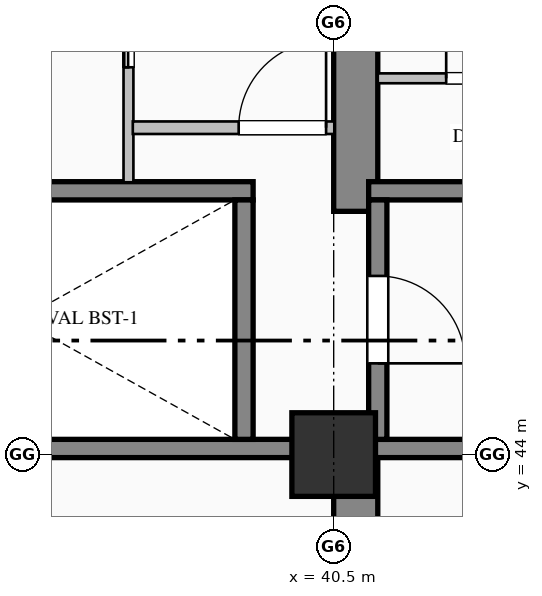
"""IFC4 building model, lengths in metres.
Left out: names, types, materials, properties, quantities, classifications, styles, units other than length and angle.
Written with IfcOpenShell. Run it as: python <this file> out.ifc"""

import sys

from ifc_helpers import new_model, si_unit, direction, frame, frame_2d, origin, origin_2d, place, context, subcontext, project, spatial, rectangle, extrude, element, fill, save


model = new_model("IFC4")
c1 = context("Model", 3, precision=1e-05, world=origin(), true_north=direction((0.0, 1.0)))
c2 = subcontext(c1, "Body", "Model", "MODEL_VIEW")
j1 = project(units=[si_unit("LENGTHUNIT", "METRE"), si_unit("PLANEANGLEUNIT", "RADIAN")], contexts=[c1])
p1 = place(None, origin())
s1 = spatial("IfcSite", under=j1, at=p1, CompositionType="ELEMENT")
p2 = place(p1, origin())
s2 = spatial("IfcBuilding", under=s1, at=p2, CompositionType="ELEMENT")
p3 = place(p2, origin())
s3 = spatial("IfcBuildingStorey", under=s2, at=p3, CompositionType="ELEMENT", Elevation=0.0)
p4 = place(p3, frame((40.79, 36.58, 0.0), z_axis=(0.0, 0.0, 1.0), x_axis=(0.0, 1.0, 0.0)))
e1 = element("IfcWall", 1, at=p4, inside=s3, PredefinedType="SHEAR", context=c2, shape_type="SweptSolid", body=[
    extrude(rectangle(XDim=7.82, YDim=0.58, at=frame_2d((3.91, 0.0))), origin(), (0.0, 0.0, 1.0), 5.72),
])
p5 = place(p3, frame((40.79, 47.2, 0.0), z_axis=(0.0, 0.0, 1.0), x_axis=(0.0, 1.0, 0.0)))
e2 = element("IfcWall", 2, at=p5, inside=s3, PredefinedType="SHEAR", context=c2, shape_type="SweptSolid", body=[
    extrude(rectangle(XDim=4.22, YDim=0.58, at=frame_2d((2.11, 0.0))), origin(), (0.0, 0.0, 1.0), 5.72),
])
p6 = place(p3, frame((40.5, 44.0, 0.0), z_axis=(0.0, 0.0, 1.0), x_axis=(1.0, 0.0, 0.0)))
e3 = element("IfcColumn", 3, at=p6, inside=s3, PredefinedType="COLUMN", context=c2, shape_type="SweptSolid", body=[
    extrude(rectangle(XDim=1.1, YDim=1.1, at=origin_2d()), origin(), (0.0, 0.0, 1.0), 6.0),
])
for number, where, z_axis, x_axis in (
    (4, (40.96, 47.47, 0.0), (0.0, 0.0, 1.0), (1.0, 0.0, 0.0)),
    (5, (49.04, 44.08, 0.0), (0.0, 0.0, 1.0), (-1.0, 0.0, 0.0)),
):
    element("IfcWall", number, at=place(p3, frame(where, z_axis=z_axis, x_axis=x_axis)), inside=s3, PredefinedType="SOLIDWALL", context=c2, shape_type="SweptSolid", body=[
        extrude(rectangle(XDim=8.08, YDim=0.24, at=frame_2d((4.04, 0.0))), origin(), (0.0, 0.0, 1.0), 6.0),
    ])
p7 = place(p3, frame((41.08, 47.35, 0.0), z_axis=(0.0, 0.0, 1.0), x_axis=(0.0, -1.0, 0.0)))
e6 = element("IfcWall", 6, at=p7, inside=s3, PredefinedType="SOLIDWALL", context=c2, shape_type="SweptSolid", body=[
    extrude(rectangle(XDim=3.15, YDim=0.24, at=frame_2d((1.575, 0.0))), origin(), (0.0, 0.0, 1.0), 6.0),
])
p8 = place(p7, frame((1.0, 0.0, 0.0)))
e7 = element("IfcOpeningElement", 7, at=p8, cuts=e6, PredefinedType="OPENING", context=c2, shape_type="SweptSolid", body=[
    extrude(rectangle(XDim=1.15, YDim=2.2, at=frame_2d((0.575, 1.1))), frame((0.0, 0.13, 0.0), z_axis=(0.0, -1.0, 0.0), x_axis=(1.0, 0.0, 0.0)), (0.0, 0.0, 1.0), 0.26),
])
p9 = place(p3, frame((31.56, 47.47, 0.0), z_axis=(0.0, 0.0, 1.0), x_axis=(1.0, 0.0, 0.0)))
e8 = element("IfcWall", 8, at=p9, inside=s3, PredefinedType="SOLIDWALL", context=c2, shape_type="SweptSolid", body=[
    extrude(rectangle(XDim=7.88, YDim=0.24, at=frame_2d((3.94, 0.0))), origin(), (0.0, 0.0, 1.0), 6.0),
])
p10 = place(p3, frame((39.97, 44.08, 0.0), z_axis=(0.0, 0.0, 1.0), x_axis=(-1.0, 0.0, 0.0)))
e9 = element("IfcWall", 9, at=p10, inside=s3, PredefinedType="SOLIDWALL", context=c2, shape_type="SweptSolid", body=[
    extrude(rectangle(XDim=8.41, YDim=0.24, at=frame_2d((4.205, 0.0))), origin(), (0.0, 0.0, 1.0), 6.0),
])
p11 = place(p3, frame((39.32, 44.2, 0.0), z_axis=(0.0, 0.0, 1.0), x_axis=(0.0, 1.0, 0.0)))
e10 = element("IfcWall", 10, at=p11, inside=s3, PredefinedType="SOLIDWALL", context=c2, shape_type="SweptSolid", body=[
    extrude(rectangle(XDim=3.15, YDim=0.24, at=frame_2d((1.575, 0.0))), origin(), (0.0, 0.0, 1.0), 6.0),
])
p12 = place(p3, frame((37.8, 47.582, 0.0), z_axis=(0.0, 0.0, 1.0), x_axis=(0.0, 1.0, 0.0)))
e11 = element("IfcWall", 11, at=p12, inside=s3, PredefinedType="PARTITIONING", context=c2, shape_type="SweptSolid", body=[
    extrude(rectangle(XDim=4.046, YDim=0.13, at=frame_2d((2.023, 0.0))), origin(), (0.0, 0.0, 1.0), 5.72),
])
p13 = place(p12, frame((1.513, 0.0, 0.0)))
e12 = element("IfcOpeningElement", 12, at=p13, cuts=e11, PredefinedType="OPENING", context=c2, shape_type="SweptSolid", body=[
    extrude(rectangle(XDim=1.02, YDim=2.15, at=frame_2d((0.51, 1.075))), frame((0.0, 0.075, 0.0), z_axis=(0.0, -1.0, 0.0), x_axis=(1.0, 0.0, 0.0)), (0.0, 0.0, 1.0), 0.15),
])
p14 = place(p3, frame((41.08, 48.95, 0.0), z_axis=(0.0, 0.0, 1.0), x_axis=(1.0, 0.0, 0.0)))
e13 = element("IfcWall", 13, at=p14, inside=s3, PredefinedType="PARTITIONING", context=c2, shape_type="SweptSolid", body=[
    extrude(rectangle(XDim=2.72, YDim=0.13, at=frame_2d((1.36, 0.0))), origin(), (0.0, 0.0, 1.0), 5.72),
])
p15 = place(p14, frame((0.9, 0.0, 0.0)))
e14 = element("IfcOpeningElement", 14, at=p15, cuts=e13, PredefinedType="OPENING", context=c2, shape_type="SweptSolid", body=[
    extrude(rectangle(XDim=0.92, YDim=2.15, at=frame_2d((0.46, 1.075))), frame((0.0, 0.075, 0.0), z_axis=(0.0, -1.0, 0.0), x_axis=(1.0, 0.0, 0.0)), (0.0, 0.0, 1.0), 0.15),
])
p16 = place(p3, frame((37.857, 48.3, 0.0), z_axis=(0.0, 0.0, 1.0), x_axis=(1.0, 0.0, 0.0)))
e15 = element("IfcWall", 15, at=p16, inside=s3, PredefinedType="PARTITIONING", context=c2, shape_type="SweptSolid", body=[
    extrude(rectangle(XDim=2.651, YDim=0.165, at=frame_2d((1.326, 0.0))), origin(), (0.0, 0.0, 1.0), 5.72),
])
p17 = place(p16, frame((1.393, 0.0, 0.0)))
e16 = element("IfcOpeningElement", 16, at=p17, cuts=e15, PredefinedType="OPENING", context=c2, shape_type="SweptSolid", body=[
    extrude(rectangle(XDim=1.15, YDim=2.2, at=frame_2d((0.575, 1.1))), frame((0.0, 0.093, 0.0), z_axis=(0.0, -1.0, 0.0), x_axis=(1.0, 0.0, 0.0)), (0.0, 0.0, 1.0), 0.185),
])
p18 = place(p8, origin())
e17 = element("IfcDoor", 17, at=p18, inside=s3, OperationType="SINGLE_SWING_RIGHT", PredefinedType="DOOR", context=c2, shape_type="SweptSolid", body=[
    extrude(rectangle(XDim=1.15, YDim=2.2, at=frame_2d((0.575, 1.1))), frame((0.0, 0.025, 0.0), z_axis=(0.0, -1.0, 0.0), x_axis=(1.0, 0.0, 0.0)), (0.0, 0.0, 1.0), 0.05),
])
fill(e7, e17)
p19 = place(p13, origin())
e18 = element("IfcDoor", 18, at=p19, inside=s3, OperationType="SLIDING_TO_LEFT", PredefinedType="DOOR", context=c2, shape_type="SweptSolid", body=[
    extrude(rectangle(XDim=1.02, YDim=2.15, at=frame_2d((0.51, 1.075))), frame((0.0, 0.025, 0.0), z_axis=(0.0, -1.0, 0.0), x_axis=(1.0, 0.0, 0.0)), (0.0, 0.0, 1.0), 0.05),
])
fill(e12, e18)
p20 = place(p15, origin())
e19 = element("IfcDoor", 19, at=p20, inside=s3, OperationType="SINGLE_SWING_LEFT", PredefinedType="DOOR", context=c2, shape_type="SweptSolid", body=[
    extrude(rectangle(XDim=0.92, YDim=2.15, at=frame_2d((0.46, 1.075))), frame((0.0, 0.025, 0.0), z_axis=(0.0, -1.0, 0.0), x_axis=(1.0, 0.0, 0.0)), (0.0, 0.0, 1.0), 0.05),
])
fill(e14, e19)
p21 = place(p17, origin())
e20 = element("IfcDoor", 20, at=p21, inside=s3, OperationType="SINGLE_SWING_RIGHT", PredefinedType="DOOR", context=c2, shape_type="SweptSolid", body=[
    extrude(rectangle(XDim=1.15, YDim=2.2, at=frame_2d((0.575, 1.1))), frame((0.0, 0.025, 0.0), z_axis=(0.0, -1.0, 0.0), x_axis=(1.0, 0.0, 0.0)), (0.0, 0.0, 1.0), 0.05),
])
fill(e16, e20)
save(model, sys.argv[1])
